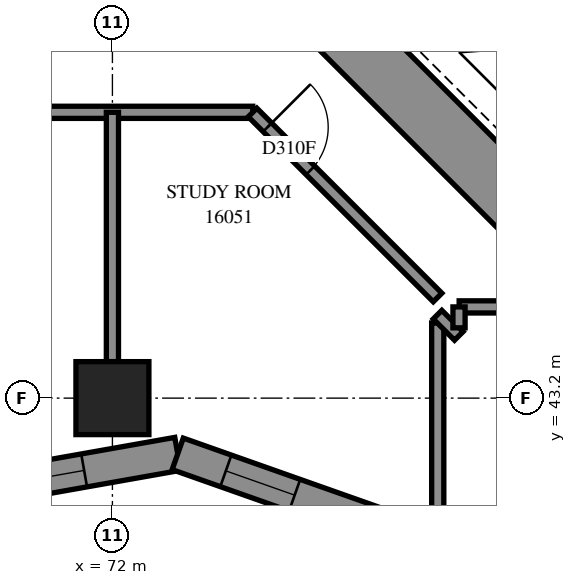
"""IFC4 building model, lengths in metres.
Left out: names, types, materials, properties, quantities, classifications, styles, units other than length and angle.
Written with IfcOpenShell. Run it as: python <this file> out.ifc"""

import sys

from ifc_helpers import new_model, si_unit, direction, frame, frame_2d, origin, origin_2d, place, context, subcontext, project, spatial, polyline, rectangle, outline, extrude, element, fill, save


model = new_model("IFC4")
c1 = context("Model", 3, precision=1e-05, world=origin(), true_north=direction((0.0, 1.0)))
c2 = subcontext(c1, "Body", "Model", "MODEL_VIEW")
j1 = project(units=[si_unit("LENGTHUNIT", "METRE"), si_unit("PLANEANGLEUNIT", "RADIAN")], contexts=[c1])
p1 = place(None, origin())
s1 = spatial("IfcSite", under=j1, at=p1, CompositionType="ELEMENT")
p2 = place(p1, origin())
s2 = spatial("IfcBuilding", under=s1, at=p2, CompositionType="ELEMENT")
p3 = place(p2, frame((0.0, 0.0, 61.0)))
s3 = spatial("IfcBuildingStorey", under=s2, at=p3, CompositionType="ELEMENT", Elevation=61.0)
p4 = place(p3, frame((72.0, 43.2, 0.0), z_axis=(0.0, 0.0, 1.0), x_axis=(1.0, 0.0, 0.0)))
e1 = element("IfcColumn", 1, at=p4, inside=s3, PredefinedType="COLUMN", context=c2, shape_type="SweptSolid", body=[
    extrude(rectangle(XDim=1.2, YDim=1.2, at=origin_2d()), origin(), (0.0, 0.0, 1.0), 3.1),
])
p5 = place(p3, frame((75.594, 49.443, -0.3), z_axis=(0.0, 0.0, 1.0), x_axis=(0.7071037324, -0.70710983, 0.0)))
e2 = element("IfcWall", 2, at=p5, inside=s3, PredefinedType="SHEAR", context=c2, shape_type="SweptSolid", body=[
    extrude(rectangle(XDim=16.4, YDim=1.0, at=frame_2d((8.2, 0.0))), origin(), (0.0, 0.0, 1.0), 2.7),
])
p6 = place(p3, frame((69.643, 41.676, 0.0), z_axis=(0.0, 0.0, 1.0), x_axis=(0.9846990638, 0.1742634606, 0.0)))
e3 = element("IfcWall", 3, at=p6, inside=s3, PredefinedType="SOLIDWALL", context=c2, shape_type="SweptSolid", body=[
    extrude(outline(polyline([(-0.049, -0.275), (3.412, -0.275), (3.556, 0.275), (0.049, 0.275), (-0.049, -0.275)])), origin(), (0.0, 0.0, 1.0), 3.1),
])
p7 = place(p6, frame((0.721, 0.0, 0.5)))
e4 = element("IfcOpeningElement", 4, at=p7, cuts=e3, PredefinedType="OPENING", context=c2, shape_type="SweptSolid", body=[
    extrude(rectangle(XDim=1.2, YDim=2.45, at=frame_2d((0.6, 1.225))), frame((0.0, 0.285, 0.0), z_axis=(0.0, -1.0, 0.0), x_axis=(1.0, 0.0, 0.0)), (0.0, 0.0, 1.0), 0.57),
])
p8 = place(p3, frame((73.074, 42.283, 0.0), z_axis=(0.0, 0.0, 1.0), x_axis=(0.9429519654, -0.3329288077, 0.0)))
e5 = element("IfcWall", 5, at=p8, inside=s3, PredefinedType="SOLIDWALL", context=c2, shape_type="SweptSolid", body=[
    extrude(outline(polyline([(0.072, -0.275), (3.686, -0.275), (3.725, 0.275), (-0.072, 0.275), (0.072, -0.275)])), origin(), (0.0, 0.0, 1.0), 3.1),
])
p9 = place(p8, frame((0.84, 0.0, 0.5)))
e6 = element("IfcOpeningElement", 6, at=p9, cuts=e5, PredefinedType="OPENING", context=c2, shape_type="SweptSolid", body=[
    extrude(rectangle(XDim=1.2, YDim=2.45, at=frame_2d((0.6, 1.225))), frame((0.0, 0.285, 0.0), z_axis=(0.0, -1.0, 0.0), x_axis=(1.0, 0.0, 0.0)), (0.0, 0.0, 1.0), 0.57),
])
p10 = place(p3, frame((55.1, 47.9, 0.0), z_axis=(0.0, 0.0, 1.0), x_axis=(1.0, 0.0, 0.0)))
e7 = element("IfcWall", 7, at=p10, inside=s3, PredefinedType="PARTITIONING", context=c2, shape_type="SweptSolid", body=[
    extrude(rectangle(XDim=19.208, YDim=0.2, at=frame_2d((9.604, 0.0))), origin(), (0.0, 0.0, 1.0), 3.1),
])
p11 = place(p10, frame((6.399, 0.0, 0.0)))
e8 = element("IfcOpeningElement", 8, at=p11, cuts=e7, PredefinedType="OPENING", context=c2, shape_type="SweptSolid", body=[
    extrude(rectangle(XDim=0.9, YDim=2.1, at=frame_2d((0.45, 1.05))), frame((0.0, 0.11, 0.0), z_axis=(0.0, -1.0, 0.0), x_axis=(1.0, 0.0, 0.0)), (0.0, 0.0, 1.0), 0.22),
])
p12 = place(p10, frame((13.561, 0.0, 0.0)))
e9 = element("IfcOpeningElement", 9, at=p12, cuts=e7, PredefinedType="OPENING", context=c2, shape_type="SweptSolid", body=[
    extrude(rectangle(XDim=0.9, YDim=2.1, at=frame_2d((0.45, 1.05))), frame((0.0, 0.11, 0.0), z_axis=(0.0, -1.0, 0.0), x_axis=(1.0, 0.0, 0.0)), (0.0, 0.0, 1.0), 0.22),
])
p13 = place(p3, frame((74.305, 47.897, 0.0), z_axis=(0.0, 0.0, 1.0), x_axis=(0.7071067812, -0.7071067812, 0.0)))
e10 = element("IfcWall", 10, at=p13, inside=s3, PredefinedType="PARTITIONING", context=c2, shape_type="SweptSolid", body=[
    extrude(rectangle(XDim=4.302, YDim=0.2, at=frame_2d((2.151, 0.0))), origin(), (0.0, 0.0, 1.0), 3.1),
])
p14 = place(p13, frame((0.345, 0.0, 0.0)))
e11 = element("IfcOpeningElement", 11, at=p14, cuts=e10, PredefinedType="OPENING", context=c2, shape_type="SweptSolid", body=[
    extrude(rectangle(XDim=1.0, YDim=2.1, at=frame_2d((0.5, 1.05))), frame((0.0, 0.11, 0.0), z_axis=(0.0, -1.0, 0.0), x_axis=(1.0, 0.0, 0.0)), (0.0, 0.0, 1.0), 0.22),
])
p15 = place(p3, frame((72.0, 43.8, 0.0), z_axis=(0.0, 0.0, 1.0), x_axis=(0.0, 1.0, 0.0)))
e12 = element("IfcWall", 12, at=p15, inside=s3, PredefinedType="PARTITIONING", context=c2, shape_type="SweptSolid", body=[
    extrude(rectangle(XDim=4.1, YDim=0.2, at=frame_2d((2.05, 0.0))), origin(), (0.0, 0.0, 1.0), 3.1),
])
p16 = place(p3, frame((77.35, 40.949, 0.0), z_axis=(0.0, 0.0, 1.0), x_axis=(0.0, 1.0, 0.0)))
e13 = element("IfcWall", 13, at=p16, inside=s3, PredefinedType="PARTITIONING", context=c2, shape_type="SweptSolid", body=[
    extrude(rectangle(XDim=3.487, YDim=0.2, at=frame_2d((1.743, 0.0))), origin(), (0.0, 0.0, 1.0), 3.1),
])
p17 = place(p3, frame((77.702, 44.7, 0.0), z_axis=(0.0, 0.0, 1.0), x_axis=(1.0, 0.0, 0.0)))
e14 = element("IfcWall", 14, at=p17, inside=s3, PredefinedType="PARTITIONING", context=c2, shape_type="SweptSolid", body=[
    extrude(rectangle(XDim=1.814, YDim=0.2, at=frame_2d((0.907, 0.0))), origin(), (0.0, 0.0, 1.0), 3.1),
])
p18 = place(p3, frame((77.347, 44.573, 0.0), z_axis=(0.0, 0.0, 1.0), x_axis=(0.7071067812, -0.7071067812, 0.0)))
e15 = element("IfcWall", 15, at=p18, inside=s3, PredefinedType="PARTITIONING", context=c2, shape_type="SweptSolid", body=[
    extrude(rectangle(XDim=0.495, YDim=0.2, at=frame_2d((0.247, 0.0))), origin(), (0.0, 0.0, 1.0), 3.1),
])
p19 = place(p3, frame((77.7, 44.356, 0.0), z_axis=(0.0, 0.0, 1.0), x_axis=(0.0, 1.0, 0.0)))
e16 = element("IfcWall", 16, at=p19, inside=s3, PredefinedType="PARTITIONING", context=c2, shape_type="SweptSolid", body=[
    extrude(rectangle(XDim=0.344, YDim=0.2, at=frame_2d((0.172, 0.0))), origin(), (0.0, 0.0, 1.0), 3.1),
])
p20 = place(p7, origin())
e17 = element("IfcWindow", 17, at=p20, inside=s3, PartitioningType="SINGLE_PANEL", PredefinedType="WINDOW", context=c2, shape_type="SweptSolid", body=[
    extrude(rectangle(XDim=1.2, YDim=2.45, at=frame_2d((0.6, 1.225))), frame((0.0, 0.155, 0.0), z_axis=(0.0, -1.0, 0.0), x_axis=(1.0, 0.0, 0.0)), (0.0, 0.0, 1.0), 0.06),
])
fill(e4, e17)
p21 = place(p9, origin())
e18 = element("IfcWindow", 18, at=p21, inside=s3, PartitioningType="SINGLE_PANEL", PredefinedType="WINDOW", context=c2, shape_type="SweptSolid", body=[
    extrude(rectangle(XDim=1.2, YDim=2.45, at=frame_2d((0.6, 1.225))), frame((0.0, 0.155, 0.0), z_axis=(0.0, -1.0, 0.0), x_axis=(1.0, 0.0, 0.0)), (0.0, 0.0, 1.0), 0.06),
])
fill(e6, e18)
p22 = place(p14, origin())
e19 = element("IfcDoor", 19, at=p22, inside=s3, OperationType="SINGLE_SWING_LEFT", PredefinedType="DOOR", context=c2, shape_type="SweptSolid", body=[
    extrude(rectangle(XDim=1.0, YDim=2.1, at=frame_2d((0.5, 1.05))), frame((0.0, 0.025, 0.0), z_axis=(0.0, -1.0, 0.0), x_axis=(1.0, 0.0, 0.0)), (0.0, 0.0, 1.0), 0.05),
])
fill(e11, e19)
save(model, sys.argv[1])
